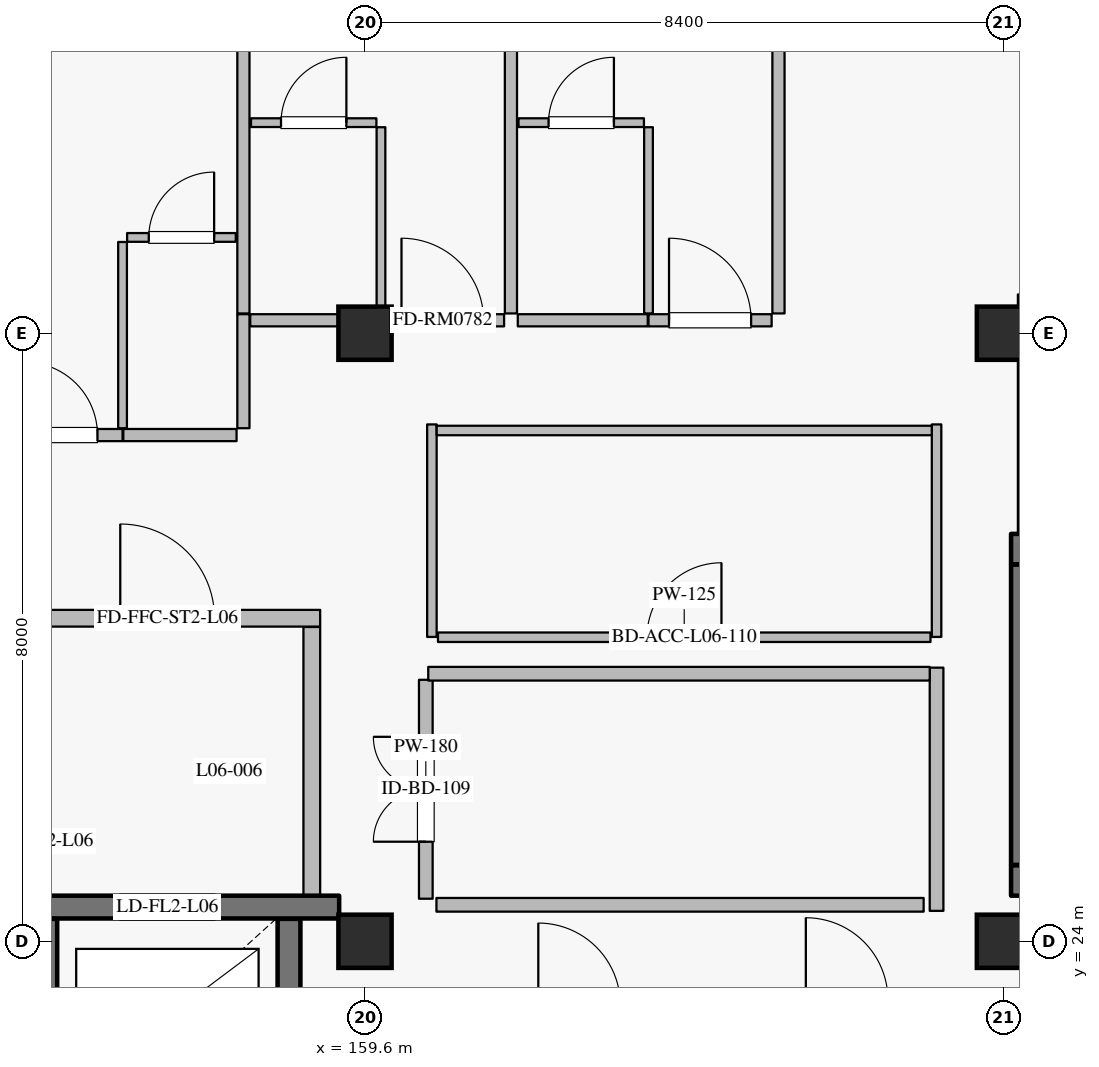
"""IFC4 building model, lengths in metres.
Left out: names, types, materials, properties, quantities, classifications, styles, units other than length and angle.
Written with IfcOpenShell. Run it as: python <this file> out.ifc"""

import sys

from ifc_helpers import new_model, si_unit, direction, frame, frame_2d, origin, origin_2d, place, context, subcontext, project, spatial, rectangle, extrude, element, fill, save


model = new_model("IFC4")
c1 = context("Model", 3, precision=1e-05, world=origin(), true_north=direction((0.0, 1.0)))
c2 = subcontext(c1, "Body", "Model", "MODEL_VIEW")
j1 = project(units=[si_unit("LENGTHUNIT", "METRE"), si_unit("PLANEANGLEUNIT", "RADIAN")], contexts=[c1])
p1 = place(None, origin())
s1 = spatial("IfcSite", under=j1, at=p1, CompositionType="ELEMENT")
p2 = place(p1, origin())
s2 = spatial("IfcBuilding", under=s1, at=p2, CompositionType="ELEMENT")
p3 = place(p2, frame((0.0, 0.0, 28.8)))
s3 = spatial("IfcBuildingStorey", under=s2, at=p3, CompositionType="ELEMENT", Elevation=28.8)
for number, where, z_axis, x_axis in (
    (1, (159.6, 24.0, 0.0), (0.0, 0.0, 1.0), (1.0, 0.0, 0.0)),
    (2, (168.0, 32.0, 0.0), (0.0, 0.0, 1.0), (1.0, 0.0, 0.0)),
    (3, (159.6, 32.0, 0.0), (0.0, 0.0, 1.0), (1.0, 0.0, 0.0)),
    (4, (168.0, 24.0, 0.0), (0.0, 0.0, 1.0), (1.0, 0.0, 0.0)),
):
    element("IfcColumn", number, at=place(p3, frame(where, z_axis=z_axis, x_axis=x_axis)), inside=s3, PredefinedType="COLUMN", context=c2, shape_type="SweptSolid", body=[
        extrude(rectangle(XDim=0.7, YDim=0.7, at=origin_2d()), origin(), (0.0, 0.0, 1.0), 3.6),
    ])
p4 = place(p3, frame((158.6, 21.705, 0.0), z_axis=(0.0, 0.0, 1.0), x_axis=(0.0, 1.0, 0.0)))
e5 = element("IfcWall", 5, at=p4, inside=s3, PredefinedType="SHEAR", context=c2, shape_type="SweptSolid", body=[
    extrude(rectangle(XDim=2.59, YDim=0.3, at=frame_2d((1.295, 0.0))), origin(), (0.0, 0.0, 1.0), 3.365),
])
p5 = place(p3, frame((159.26, 24.45, 0.0), z_axis=(0.0, 0.0, 1.0), x_axis=(-1.0, 0.0, 0.0)))
e6 = element("IfcWall", 6, at=p5, inside=s3, PredefinedType="SHEAR", context=c2, shape_type="SweptSolid", body=[
    extrude(rectangle(XDim=4.01, YDim=0.3, at=frame_2d((2.005, 0.0))), origin(), (0.0, 0.0, 1.0), 3.365),
])
p6 = place(p5, frame((1.635, 0.0, 0.0)))
e7 = element("IfcOpeningElement", 7, at=p6, cuts=e6, PredefinedType="OPENING", context=c2, shape_type="SweptSolid", body=[
    extrude(rectangle(XDim=1.25, YDim=2.25, at=frame_2d((0.625, 1.125))), frame((0.0, 0.16, 0.0), z_axis=(0.0, -1.0, 0.0), x_axis=(1.0, 0.0, 0.0)), (0.0, 0.0, 1.0), 0.32),
])
p7 = place(p3, frame((155.4, 24.295, 0.0), z_axis=(0.0, 0.0, 1.0), x_axis=(0.0, -1.0, 0.0)))
e8 = element("IfcWall", 8, at=p7, inside=s3, PredefinedType="SHEAR", context=c2, shape_type="SweptSolid", body=[
    extrude(rectangle(XDim=2.59, YDim=0.3, at=frame_2d((1.295, 0.0))), origin(), (0.0, 0.0, 1.0), 3.365),
])
p8 = place(p3, frame((158.9, 24.605, 0.0), z_axis=(0.0, 0.0, 1.0), x_axis=(0.0, 1.0, 0.0)))
e9 = element("IfcWall", 9, at=p8, inside=s3, PredefinedType="PARTITIONING", context=c2, shape_type="SweptSolid", body=[
    extrude(rectangle(XDim=3.53, YDim=0.22, at=frame_2d((1.765, 0.0))), origin(), (0.0, 0.0, 1.0), 3.365),
])
p9 = place(p3, frame((154.99, 28.25, 0.0), z_axis=(0.0, 0.0, 1.0), x_axis=(1.0, 0.0, 0.0)))
e10 = element("IfcWall", 10, at=p9, inside=s3, PredefinedType="PARTITIONING", context=c2, shape_type="SweptSolid", body=[
    extrude(rectangle(XDim=4.02, YDim=0.22, at=frame_2d((2.01, 0.0))), origin(), (0.0, 0.0, 1.0), 3.365),
])
p10 = place(p9, frame((1.39, 0.0, 0.0)))
e11 = element("IfcOpeningElement", 11, at=p10, cuts=e10, PredefinedType="OPENING", context=c2, shape_type="SweptSolid", body=[
    extrude(rectangle(XDim=1.24, YDim=2.2, at=frame_2d((0.62, 1.1))), frame((0.0, 0.12, 0.0), z_axis=(0.0, -1.0, 0.0), x_axis=(1.0, 0.0, 0.0)), (0.0, 0.0, 1.0), 0.24),
])
p11 = place(p3, frame((168.1, 24.8, 0.0), z_axis=(0.0, 0.0, 1.0), x_axis=(1.0, 0.0, 0.0)))
e12 = element("IfcWall", 12, at=p11, inside=s3, PredefinedType="SHEAR", context=c2, shape_type="SweptSolid", body=[
    extrude(rectangle(XDim=8.15, YDim=0.4, at=frame_2d((4.075, 0.0))), origin(), (0.0, 0.0, 1.0), 3.365),
])
p12 = place(p3, frame((168.1, 29.16, 0.0), z_axis=(0.0, 0.0, 1.0), x_axis=(1.0, 0.0, 0.0)))
e13 = element("IfcWall", 13, at=p12, inside=s3, PredefinedType="SHEAR", context=c2, shape_type="SweptSolid", body=[
    extrude(rectangle(XDim=8.15, YDim=0.4, at=frame_2d((4.075, 0.0))), origin(), (0.0, 0.0, 1.0), 3.365),
])
p13 = place(p12, frame((0.43, 0.0, 0.0)))
e14 = element("IfcOpeningElement", 14, at=p13, cuts=e13, PredefinedType="OPENING", context=c2, shape_type="SweptSolid", body=[
    extrude(rectangle(XDim=1.16, YDim=2.2, at=frame_2d((0.58, 1.1))), frame((0.0, 0.21, 0.0), z_axis=(0.0, -1.0, 0.0), x_axis=(1.0, 0.0, 0.0)), (0.0, 0.0, 1.0), 0.42),
])
p14 = place(p3, frame((168.3, 25.005, 0.0), z_axis=(0.0, 0.0, 1.0), x_axis=(0.0, 1.0, 0.0)))
e15 = element("IfcWall", 15, at=p14, inside=s3, PredefinedType="SHEAR", context=c2, shape_type="SweptSolid", body=[
    extrude(rectangle(XDim=3.95, YDim=0.4, at=frame_2d((1.975, 0.0))), origin(), (0.0, 0.0, 1.0), 3.365),
])
p15 = place(p3, frame((168.3, 29.365, 0.0), z_axis=(0.0, 0.0, 1.0), x_axis=(0.0, 1.0, 0.0)))
e16 = element("IfcWall", 16, at=p15, inside=s3, PredefinedType="PARTITIONING", context=c2, shape_type="SweptSolid", body=[
    extrude(rectangle(XDim=2.92, YDim=0.22, at=frame_2d((1.46, 0.0))), origin(), (0.0, 0.0, 1.0), 3.365),
])
p16 = place(p3, frame((168.19, 32.4, 0.0), z_axis=(0.0, 0.0, 1.0), x_axis=(1.0, 0.0, 0.0)))
e17 = element("IfcWall", 17, at=p16, inside=s3, PredefinedType="PARTITIONING", context=c2, shape_type="SweptSolid", body=[
    extrude(rectangle(XDim=4.22, YDim=0.22, at=frame_2d((2.11, 0.0))), origin(), (0.0, 0.0, 1.0), 3.365),
])
p17 = place(p16, frame((1.55, 0.0, 0.0)))
e18 = element("IfcOpeningElement", 18, at=p17, cuts=e17, PredefinedType="OPENING", context=c2, shape_type="SweptSolid", body=[
    extrude(rectangle(XDim=1.12, YDim=2.2, at=frame_2d((0.56, 1.1))), frame((0.0, 0.12, 0.0), z_axis=(0.0, -1.0, 0.0), x_axis=(1.0, 0.0, 0.0)), (0.0, 0.0, 1.0), 0.24),
])
p18 = place(p3, frame((154.79, 30.66, 0.0), z_axis=(0.0, 0.0, 1.0), x_axis=(1.0, 0.0, 0.0)))
e19 = element("IfcWall", 19, at=p18, inside=s3, PredefinedType="PARTITIONING", context=c2, shape_type="SweptSolid", body=[
    extrude(rectangle(XDim=1.62, YDim=0.16, at=frame_2d((0.81, 0.0))), origin(), (0.0, 0.0, 1.0), 3.365),
])
p19 = place(p18, frame((0.33, 0.0, 0.0)))
e20 = element("IfcOpeningElement", 20, at=p19, cuts=e19, PredefinedType="OPENING", context=c2, shape_type="SweptSolid", body=[
    extrude(rectangle(XDim=0.96, YDim=2.2, at=frame_2d((0.48, 1.1))), frame((0.0, 0.09, 0.0), z_axis=(0.0, -1.0, 0.0), x_axis=(1.0, 0.0, 0.0)), (0.0, 0.0, 1.0), 0.18),
])
p20 = place(p3, frame((156.42, 30.66, 0.0), z_axis=(0.0, 0.0, 1.0), x_axis=(1.0, 0.0, 0.0)))
e21 = element("IfcWall", 21, at=p20, inside=s3, PredefinedType="PARTITIONING", context=c2, shape_type="SweptSolid", body=[
    extrude(rectangle(XDim=1.49, YDim=0.16, at=frame_2d((0.745, 0.0))), origin(), (0.0, 0.0, 1.0), 3.365),
])
p21 = place(p3, frame((156.41, 30.75, 0.0), z_axis=(0.0, 0.0, 1.0), x_axis=(0.0, 1.0, 0.0)))
e22 = element("IfcWall", 22, at=p21, inside=s3, PredefinedType="PARTITIONING", context=c2, shape_type="SweptSolid", body=[
    extrude(rectangle(XDim=2.45, YDim=0.115, at=frame_2d((1.225, 0.0))), origin(), (0.0, 0.0, 1.0), 3.365),
])
p22 = place(p3, frame((156.47, 33.26, 0.0), z_axis=(0.0, 0.0, 1.0), x_axis=(1.0, 0.0, 0.0)))
e23 = element("IfcWall", 23, at=p22, inside=s3, PredefinedType="PARTITIONING", context=c2, shape_type="SweptSolid", body=[
    extrude(rectangle(XDim=1.43, YDim=0.115, at=frame_2d((0.715, 0.0))), origin(), (0.0, 0.0, 1.0), 3.365),
])
p23 = place(p22, frame((0.285, 0.0, 0.0)))
e24 = element("IfcOpeningElement", 24, at=p23, cuts=e23, PredefinedType="OPENING", context=c2, shape_type="SweptSolid", body=[
    extrude(rectangle(XDim=0.86, YDim=2.12, at=frame_2d((0.43, 1.06))), frame((0.0, 0.067, 0.0), z_axis=(0.0, -1.0, 0.0), x_axis=(1.0, 0.0, 0.0)), (0.0, 0.0, 1.0), 0.135),
])
p24 = place(p3, frame((158.0, 30.75, 0.0), z_axis=(0.0, 0.0, 1.0), x_axis=(0.0, 1.0, 0.0)))
e25 = element("IfcWall", 25, at=p24, inside=s3, PredefinedType="PARTITIONING", context=c2, shape_type="SweptSolid", body=[
    extrude(rectangle(XDim=1.5, YDim=0.16, at=frame_2d((0.75, 0.0))), origin(), (0.0, 0.0, 1.0), 3.365),
])
p25 = place(p3, frame((158.09, 32.17, 0.0), z_axis=(0.0, 0.0, 1.0), x_axis=(1.0, 0.0, 0.0)))
e26 = element("IfcWall", 26, at=p25, inside=s3, PredefinedType="PARTITIONING", context=c2, shape_type="SweptSolid", body=[
    extrude(rectangle(XDim=1.71, YDim=0.16, at=frame_2d((0.855, 0.0))), origin(), (0.0, 0.0, 1.0), 3.365),
])
p26 = place(p3, frame((159.81, 32.17, 0.0), z_axis=(0.0, 0.0, 1.0), x_axis=(1.0, 0.0, 0.0)))
e27 = element("IfcWall", 27, at=p26, inside=s3, PredefinedType="PARTITIONING", context=c2, shape_type="SweptSolid", body=[
    extrude(rectangle(XDim=1.62, YDim=0.16, at=frame_2d((0.81, 0.0))), origin(), (0.0, 0.0, 1.0), 3.365),
])
p27 = place(p26, frame((0.27, 0.0, 0.0)))
e28 = element("IfcOpeningElement", 28, at=p27, cuts=e27, PredefinedType="OPENING", context=c2, shape_type="SweptSolid", body=[
    extrude(rectangle(XDim=1.08, YDim=2.3, at=frame_2d((0.54, 1.15))), frame((0.0, 0.09, 0.0), z_axis=(0.0, -1.0, 0.0), x_axis=(1.0, 0.0, 0.0)), (0.0, 0.0, 1.0), 0.18),
])
p28 = place(p3, frame((159.81, 32.26, 0.0), z_axis=(0.0, 0.0, 1.0), x_axis=(0.0, 1.0, 0.0)))
e29 = element("IfcWall", 29, at=p28, inside=s3, PredefinedType="PARTITIONING", context=c2, shape_type="SweptSolid", body=[
    extrude(rectangle(XDim=2.45, YDim=0.115, at=frame_2d((1.225, 0.0))), origin(), (0.0, 0.0, 1.0), 2.73),
])
p29 = place(p3, frame((158.1, 34.77, 0.0), z_axis=(0.0, 0.0, 1.0), x_axis=(1.0, 0.0, 0.0)))
e30 = element("IfcWall", 30, at=p29, inside=s3, PredefinedType="PARTITIONING", context=c2, shape_type="SweptSolid", body=[
    extrude(rectangle(XDim=1.65, YDim=0.115, at=frame_2d((0.825, 0.0))), origin(), (0.0, 0.0, 1.0), 3.365),
])
p30 = place(p29, frame((0.395, 0.0, 0.0)))
e31 = element("IfcOpeningElement", 31, at=p30, cuts=e30, PredefinedType="OPENING", context=c2, shape_type="SweptSolid", body=[
    extrude(rectangle(XDim=0.86, YDim=2.12, at=frame_2d((0.43, 1.06))), frame((0.0, 0.067, 0.0), z_axis=(0.0, -1.0, 0.0), x_axis=(1.0, 0.0, 0.0)), (0.0, 0.0, 1.0), 0.135),
])
p31 = place(p3, frame((158.0, 32.26, 0.0), z_axis=(0.0, 0.0, 1.0), x_axis=(0.0, 1.0, 0.0)))
e32 = element("IfcWall", 32, at=p31, inside=s3, PredefinedType="PARTITIONING", context=c2, shape_type="SweptSolid", body=[
    extrude(rectangle(XDim=7.4, YDim=0.16, at=frame_2d((3.7, 0.0))), origin(), (0.0, 0.0, 1.0), 3.365),
])
p32 = place(p3, frame((161.61, 32.17, 0.0), z_axis=(0.0, 0.0, 1.0), x_axis=(1.0, 0.0, 0.0)))
e33 = element("IfcWall", 33, at=p32, inside=s3, PredefinedType="PARTITIONING", context=c2, shape_type="SweptSolid", body=[
    extrude(rectangle(XDim=1.71, YDim=0.16, at=frame_2d((0.855, 0.0))), origin(), (0.0, 0.0, 1.0), 3.365),
])
p33 = place(p3, frame((163.33, 32.17, 0.0), z_axis=(0.0, 0.0, 1.0), x_axis=(1.0, 0.0, 0.0)))
e34 = element("IfcWall", 34, at=p33, inside=s3, PredefinedType="PARTITIONING", context=c2, shape_type="SweptSolid", body=[
    extrude(rectangle(XDim=1.62, YDim=0.16, at=frame_2d((0.81, 0.0))), origin(), (0.0, 0.0, 1.0), 3.365),
])
p34 = place(p33, frame((0.27, 0.0, 0.0)))
e35 = element("IfcOpeningElement", 35, at=p34, cuts=e34, PredefinedType="OPENING", context=c2, shape_type="SweptSolid", body=[
    extrude(rectangle(XDim=1.08, YDim=2.3, at=frame_2d((0.54, 1.15))), frame((0.0, 0.09, 0.0), z_axis=(0.0, -1.0, 0.0), x_axis=(1.0, 0.0, 0.0)), (0.0, 0.0, 1.0), 0.18),
])
p35 = place(p3, frame((163.33, 32.26, 0.0), z_axis=(0.0, 0.0, 1.0), x_axis=(0.0, 1.0, 0.0)))
e36 = element("IfcWall", 36, at=p35, inside=s3, PredefinedType="PARTITIONING", context=c2, shape_type="SweptSolid", body=[
    extrude(rectangle(XDim=2.45, YDim=0.115, at=frame_2d((1.225, 0.0))), origin(), (0.0, 0.0, 1.0), 3.365),
])
p36 = place(p3, frame((161.62, 34.77, 0.0), z_axis=(0.0, 0.0, 1.0), x_axis=(1.0, 0.0, 0.0)))
e37 = element("IfcWall", 37, at=p36, inside=s3, PredefinedType="PARTITIONING", context=c2, shape_type="SweptSolid", body=[
    extrude(rectangle(XDim=1.65, YDim=0.115, at=frame_2d((0.825, 0.0))), origin(), (0.0, 0.0, 1.0), 3.365),
])
p37 = place(p36, frame((0.395, 0.0, 0.0)))
e38 = element("IfcOpeningElement", 38, at=p37, cuts=e37, PredefinedType="OPENING", context=c2, shape_type="SweptSolid", body=[
    extrude(rectangle(XDim=0.86, YDim=2.12, at=frame_2d((0.43, 1.06))), frame((0.0, 0.067, 0.0), z_axis=(0.0, -1.0, 0.0), x_axis=(1.0, 0.0, 0.0)), (0.0, 0.0, 1.0), 0.135),
])
p38 = place(p3, frame((161.52, 32.26, 0.0), z_axis=(0.0, 0.0, 1.0), x_axis=(0.0, 1.0, 0.0)))
e39 = element("IfcWall", 39, at=p38, inside=s3, PredefinedType="PARTITIONING", context=c2, shape_type="SweptSolid", body=[
    extrude(rectangle(XDim=9.23, YDim=0.16, at=frame_2d((4.615, 0.0))), origin(), (0.0, 0.0, 1.0), 3.365),
])
p39 = place(p3, frame((165.04, 32.26, 0.0), z_axis=(0.0, 0.0, 1.0), x_axis=(0.0, 1.0, 0.0)))
e40 = element("IfcWall", 40, at=p39, inside=s3, PredefinedType="PARTITIONING", context=c2, shape_type="SweptSolid", body=[
    extrude(rectangle(XDim=8.64, YDim=0.16, at=frame_2d((4.32, 0.0))), origin(), (0.0, 0.0, 1.0), 3.365),
])
p40 = place(p3, frame((160.4, 24.56, 0.0), z_axis=(0.0, 0.0, 1.0), x_axis=(0.0, 1.0, 0.0)))
e41 = element("IfcWall", 41, at=p40, inside=s3, PredefinedType="PARTITIONING", context=c2, shape_type="SweptSolid", body=[
    extrude(rectangle(XDim=2.88, YDim=0.18, at=frame_2d((1.44, 0.0))), origin(), (0.0, 0.0, 1.0), 3.365),
])
p41 = place(p40, frame((0.75, 0.0, 0.0)))
e42 = element("IfcOpeningElement", 42, at=p41, cuts=e41, PredefinedType="OPENING", context=c2, shape_type="SweptSolid", body=[
    extrude(rectangle(XDim=1.38, YDim=2.3, at=frame_2d((0.69, 1.15))), frame((0.0, 0.1, 0.0), z_axis=(0.0, -1.0, 0.0), x_axis=(1.0, 0.0, 0.0)), (0.0, 0.0, 1.0), 0.2),
])
p42 = place(p3, frame((160.54, 24.48, 0.0), z_axis=(0.0, 0.0, 1.0), x_axis=(1.0, 0.0, 0.0)))
e43 = element("IfcWall", 43, at=p42, inside=s3, PredefinedType="PARTITIONING", context=c2, shape_type="SweptSolid", body=[
    extrude(rectangle(XDim=6.41, YDim=0.18, at=frame_2d((3.205, 0.0))), origin(), (0.0, 0.0, 1.0), 3.365),
])
p43 = place(p3, frame((160.56, 28.0, 0.0), z_axis=(0.0, 0.0, 1.0), x_axis=(1.0, 0.0, 0.0)))
e44 = element("IfcWall", 44, at=p43, inside=s3, PredefinedType="PARTITIONING", context=c2, shape_type="SweptSolid", body=[
    extrude(rectangle(XDim=6.48, YDim=0.125, at=frame_2d((3.24, 0.0))), origin(), (0.0, 0.0, 1.0), 3.365),
])
p44 = place(p43, frame((2.75, 0.0, 0.0)))
e45 = element("IfcOpeningElement", 45, at=p44, cuts=e44, PredefinedType="OPENING", context=c2, shape_type="SweptSolid", body=[
    extrude(rectangle(XDim=0.98, YDim=2.15, at=frame_2d((0.49, 1.075))), frame((0.0, 0.073, 0.0), z_axis=(0.0, -1.0, 0.0), x_axis=(1.0, 0.0, 0.0)), (0.0, 0.0, 1.0), 0.145),
])
p45 = place(p3, frame((167.12, 24.4, 0.0), z_axis=(0.0, 0.0, 1.0), x_axis=(0.0, 1.0, 0.0)))
e46 = element("IfcWall", 46, at=p45, inside=s3, PredefinedType="PARTITIONING", context=c2, shape_type="SweptSolid", body=[
    extrude(rectangle(XDim=3.2, YDim=0.18, at=frame_2d((1.6, 0.0))), origin(), (0.0, 0.0, 1.0), 3.365),
])
p46 = place(p3, frame((160.432, 27.52, 0.0), z_axis=(0.0, 0.0, 1.0), x_axis=(1.0, 0.0, 0.0)))
e47 = element("IfcWall", 47, at=p46, inside=s3, PredefinedType="PARTITIONING", context=c2, shape_type="SweptSolid", body=[
    extrude(rectangle(XDim=6.598, YDim=0.18, at=frame_2d((3.299, 0.0))), origin(), (0.0, 0.0, 1.0), 3.365),
])
for number, where, z_axis, x_axis in (
    (48, (160.48, 28.004, 0.0), (0.0, 0.0, 1.0), (0.0, 1.0, 0.0)),
    (49, (167.12, 28.004, 0.0), (0.0, 0.0, 1.0), (0.0, 1.0, 0.0)),
):
    element("IfcWall", number, at=place(p3, frame(where, z_axis=z_axis, x_axis=x_axis)), inside=s3, PredefinedType="PARTITIONING", context=c2, shape_type="SweptSolid", body=[
        extrude(rectangle(XDim=2.796, YDim=0.125, at=frame_2d((1.398, 0.0))), origin(), (0.0, 0.0, 1.0), 3.365),
    ])
p47 = place(p3, frame((160.543, 30.72, 0.0), z_axis=(0.0, 0.0, 1.0), x_axis=(1.0, 0.0, 0.0)))
e50 = element("IfcWall", 50, at=p47, inside=s3, PredefinedType="PARTITIONING", context=c2, shape_type="SweptSolid", body=[
    extrude(rectangle(XDim=6.514, YDim=0.125, at=frame_2d((3.257, 0.0))), origin(), (0.0, 0.0, 1.0), 3.365),
])
p48 = place(p6, origin())
e51 = element("IfcDoor", 51, at=p48, inside=s3, OperationType="DOUBLE_DOOR_SLIDING", PredefinedType="DOOR", context=c2, shape_type="SweptSolid", body=[
    extrude(rectangle(XDim=1.25, YDim=2.25, at=frame_2d((0.625, 1.125))), frame((0.0, 0.025, 0.0), z_axis=(0.0, -1.0, 0.0), x_axis=(1.0, 0.0, 0.0)), (0.0, 0.0, 1.0), 0.05),
])
fill(e7, e51)
p49 = place(p10, origin())
e52 = element("IfcDoor", 52, at=p49, inside=s3, OperationType="SINGLE_SWING_LEFT", PredefinedType="DOOR", context=c2, shape_type="SweptSolid", body=[
    extrude(rectangle(XDim=1.24, YDim=2.2, at=frame_2d((0.62, 1.1))), frame((0.0, 0.025, 0.0), z_axis=(0.0, -1.0, 0.0), x_axis=(1.0, 0.0, 0.0)), (0.0, 0.0, 1.0), 0.05),
])
fill(e11, e52)
p50 = place(p19, origin())
e53 = element("IfcDoor", 53, at=p50, inside=s3, OperationType="SINGLE_SWING_LEFT", PredefinedType="DOOR", context=c2, shape_type="SweptSolid", body=[
    extrude(rectangle(XDim=0.96, YDim=2.2, at=frame_2d((0.48, 1.1))), frame((0.0, 0.025, 0.0), z_axis=(0.0, -1.0, 0.0), x_axis=(1.0, 0.0, 0.0)), (0.0, 0.0, 1.0), 0.05),
])
fill(e20, e53)
p51 = place(p23, origin())
e54 = element("IfcDoor", 54, at=p51, inside=s3, OperationType="SINGLE_SWING_RIGHT", PredefinedType="DOOR", context=c2, shape_type="SweptSolid", body=[
    extrude(rectangle(XDim=0.86, YDim=2.12, at=frame_2d((0.43, 1.06))), frame((0.0, 0.025, 0.0), z_axis=(0.0, -1.0, 0.0), x_axis=(1.0, 0.0, 0.0)), (0.0, 0.0, 1.0), 0.05),
])
fill(e24, e54)
p52 = place(p27, origin())
e55 = element("IfcDoor", 55, at=p52, inside=s3, OperationType="SINGLE_SWING_LEFT", PredefinedType="DOOR", context=c2, shape_type="SweptSolid", body=[
    extrude(rectangle(XDim=1.08, YDim=2.3, at=frame_2d((0.54, 1.15))), frame((0.0, 0.025, 0.0), z_axis=(0.0, -1.0, 0.0), x_axis=(1.0, 0.0, 0.0)), (0.0, 0.0, 1.0), 0.05),
])
fill(e28, e55)
p53 = place(p30, origin())
e56 = element("IfcDoor", 56, at=p53, inside=s3, OperationType="SINGLE_SWING_RIGHT", PredefinedType="DOOR", context=c2, shape_type="SweptSolid", body=[
    extrude(rectangle(XDim=0.86, YDim=2.12, at=frame_2d((0.43, 1.06))), frame((0.0, 0.025, 0.0), z_axis=(0.0, -1.0, 0.0), x_axis=(1.0, 0.0, 0.0)), (0.0, 0.0, 1.0), 0.05),
])
fill(e31, e56)
p54 = place(p34, origin())
e57 = element("IfcDoor", 57, at=p54, inside=s3, OperationType="SINGLE_SWING_LEFT", PredefinedType="DOOR", context=c2, shape_type="SweptSolid", body=[
    extrude(rectangle(XDim=1.08, YDim=2.3, at=frame_2d((0.54, 1.15))), frame((0.0, 0.025, 0.0), z_axis=(0.0, -1.0, 0.0), x_axis=(1.0, 0.0, 0.0)), (0.0, 0.0, 1.0), 0.05),
])
fill(e35, e57)
p55 = place(p37, origin())
e58 = element("IfcDoor", 58, at=p55, inside=s3, OperationType="SINGLE_SWING_RIGHT", PredefinedType="DOOR", context=c2, shape_type="SweptSolid", body=[
    extrude(rectangle(XDim=0.86, YDim=2.12, at=frame_2d((0.43, 1.06))), frame((0.0, 0.025, 0.0), z_axis=(0.0, -1.0, 0.0), x_axis=(1.0, 0.0, 0.0)), (0.0, 0.0, 1.0), 0.05),
])
fill(e38, e58)
p56 = place(p41, origin())
e59 = element("IfcDoor", 59, at=p56, inside=s3, OperationType="DOUBLE_DOOR_SINGLE_SWING", PredefinedType="DOOR", context=c2, shape_type="SweptSolid", body=[
    extrude(rectangle(XDim=1.38, YDim=2.3, at=frame_2d((0.69, 1.15))), frame((0.0, 0.025, 0.0), z_axis=(0.0, -1.0, 0.0), x_axis=(1.0, 0.0, 0.0)), (0.0, 0.0, 1.0), 0.05),
])
fill(e42, e59)
p57 = place(p44, origin())
e60 = element("IfcDoor", 60, at=p57, inside=s3, OperationType="SINGLE_SWING_RIGHT", PredefinedType="DOOR", context=c2, shape_type="SweptSolid", body=[
    extrude(rectangle(XDim=0.98, YDim=2.15, at=frame_2d((0.49, 1.075))), frame((0.0, 0.025, 0.0), z_axis=(0.0, -1.0, 0.0), x_axis=(1.0, 0.0, 0.0)), (0.0, 0.0, 1.0), 0.05),
])
fill(e45, e60)
save(model, sys.argv[1])
